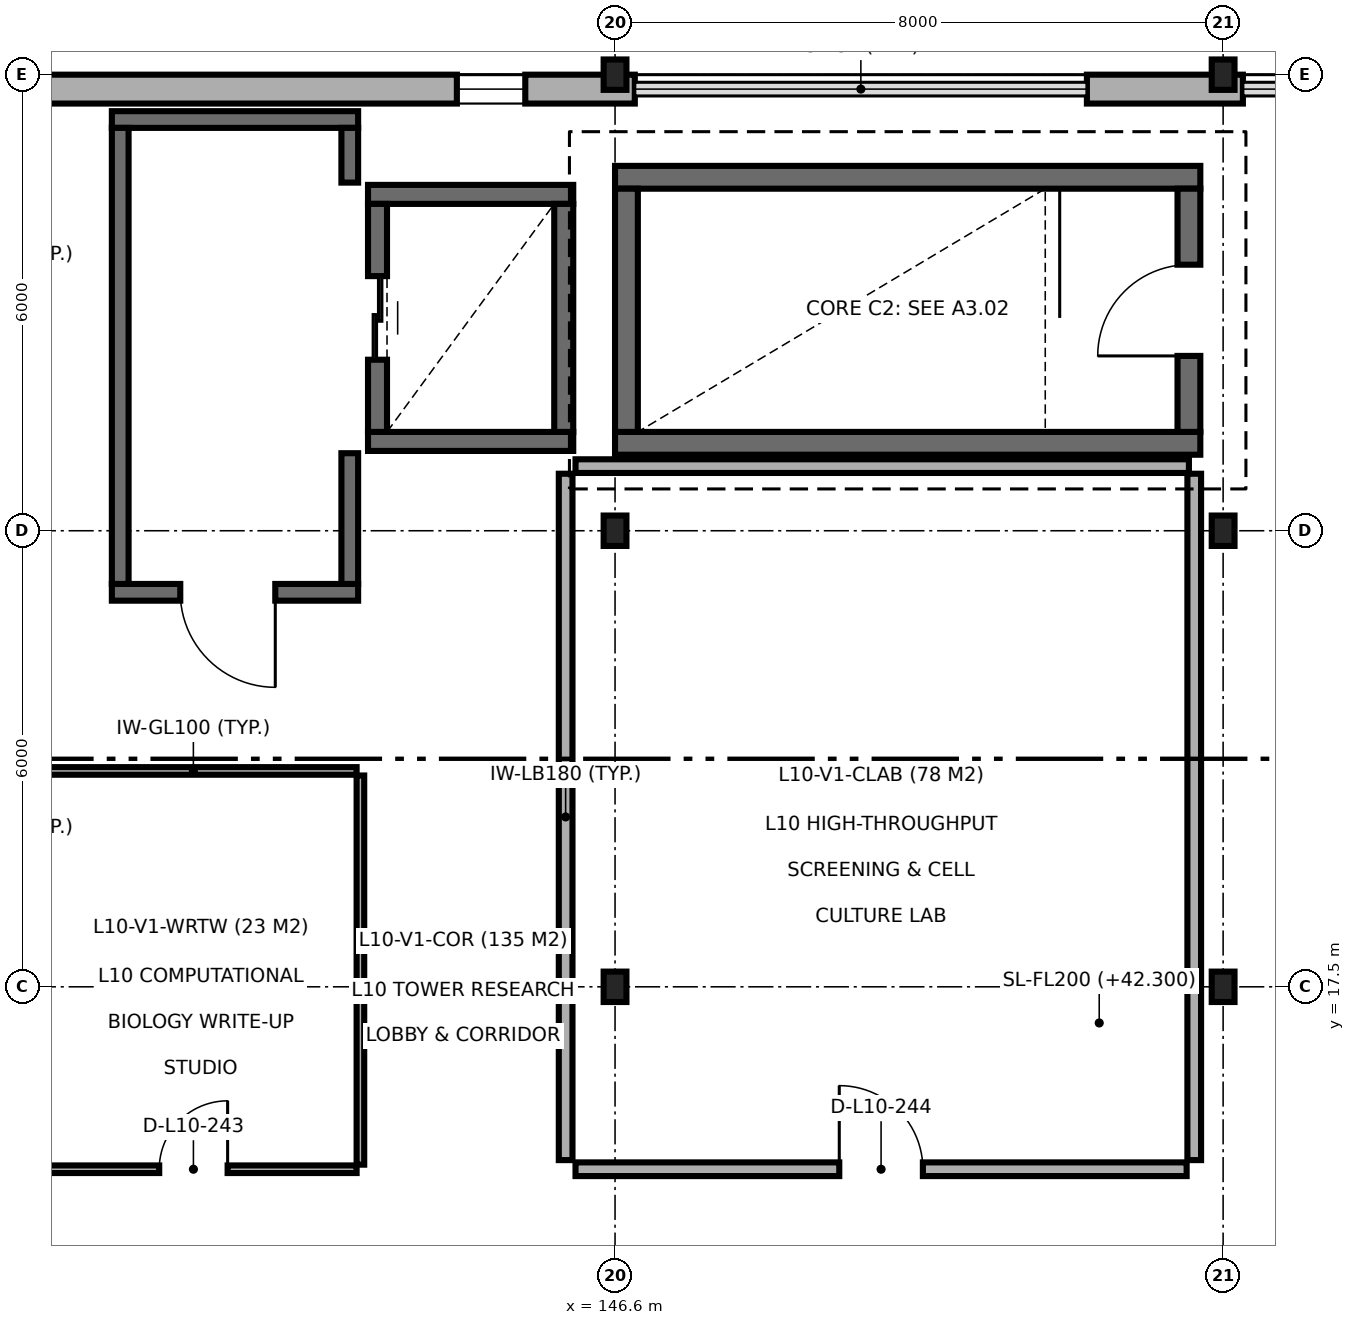
"""IFC4 building model, lengths in metres.
Left out: names, types, materials, properties, quantities, classifications, styles, units other than length and angle.
Written with IfcOpenShell. Run it as: python <this file> out.ifc"""

import sys

from ifc_helpers import new_model, si_unit, direction, frame, frame_2d, origin, origin_2d, place, context, subcontext, project, spatial, rectangle, i_section, extrude, element, fill, save


model = new_model("IFC4")
c1 = context("Model", 3, precision=1e-05, world=origin(), true_north=direction((0.0, 1.0)))
c2 = subcontext(c1, "Body", "Model", "MODEL_VIEW")
j1 = project(units=[si_unit("LENGTHUNIT", "METRE"), si_unit("PLANEANGLEUNIT", "RADIAN")], contexts=[c1])
p1 = place(None, origin())
s1 = spatial("IfcSite", under=j1, at=p1, CompositionType="ELEMENT")
p2 = place(p1, origin())
s2 = spatial("IfcBuilding", under=s1, at=p2, CompositionType="ELEMENT")
p3 = place(p2, frame((0.0, 0.0, 42.3)))
s3 = spatial("IfcBuildingStorey", under=s2, at=p3, CompositionType="ELEMENT", Elevation=42.3)
for number, where, z_axis, x_axis in (
    (1, (146.6, 17.5, 0.0), (0.0, 0.0, 1.0), (1.0, 0.0, 0.0)),
    (2, (146.6, 23.5, 0.0), (0.0, 0.0, 1.0), (1.0, 0.0, 0.0)),
    (3, (146.6, 29.5, 0.0), (0.0, 0.0, 1.0), (1.0, 0.0, 0.0)),
    (4, (154.6, 17.5, 0.0), (0.0, 0.0, 1.0), (1.0, 0.0, 0.0)),
    (5, (154.6, 23.5, 0.0), (0.0, 0.0, 1.0), (1.0, 0.0, 0.0)),
    (6, (154.6, 29.5, 0.0), (0.0, 0.0, 1.0), (1.0, 0.0, 0.0)),
):
    element("IfcColumn", number, at=place(p3, frame(where, z_axis=z_axis, x_axis=x_axis)), inside=s3, PredefinedType="COLUMN", context=c2, shape_type="SweptSolid", body=[
        extrude(i_section(OverallWidth=0.3, OverallDepth=0.4, WebThickness=0.013, FlangeThickness=0.024, FilletRadius=0.027, at=origin_2d()), origin(), (0.0, 0.0, 1.0), 3.9),
    ])
for number, where, z_axis, x_axis in (
    (7, (146.6, 24.65, 0.0), (0.0, 0.0, 1.0), (1.0, 0.0, 0.0)),
    (8, (154.3, 28.15, 0.0), (0.0, 0.0, 1.0), (-1.0, 0.0, 0.0)),
):
    element("IfcWall", number, at=place(p3, frame(where, z_axis=z_axis, x_axis=x_axis)), inside=s3, PredefinedType="SHEAR", context=c2, shape_type="SweptSolid", body=[
        extrude(rectangle(XDim=7.7, YDim=0.3, at=frame_2d((3.85, 0.0))), origin(), (0.0, 0.0, 1.0), 3.9),
    ])
p4 = place(p3, frame((146.75, 28.0, 0.0), z_axis=(0.0, 0.0, 1.0), x_axis=(0.0, -1.0, 0.0)))
e9 = element("IfcWall", 9, at=p4, inside=s3, PredefinedType="SHEAR", context=c2, shape_type="SweptSolid", body=[
    extrude(rectangle(XDim=3.2, YDim=0.3, at=frame_2d((1.6, 0.0))), origin(), (0.0, 0.0, 1.0), 3.9),
])
p5 = place(p3, frame((154.15, 24.8, 0.0), z_axis=(0.0, 0.0, 1.0), x_axis=(0.0, 1.0, 0.0)))
e10 = element("IfcWall", 10, at=p5, inside=s3, PredefinedType="SHEAR", context=c2, shape_type="SweptSolid", body=[
    extrude(rectangle(XDim=3.2, YDim=0.3, at=frame_2d((1.6, 0.0))), origin(), (0.0, 0.0, 1.0), 3.9),
])
p6 = place(p5, frame((1.0, 0.0, 0.0)))
e11 = element("IfcOpeningElement", 11, at=p6, cuts=e10, PredefinedType="OPENING", context=c2, shape_type="SweptSolid", body=[
    extrude(rectangle(XDim=1.2, YDim=2.15, at=frame_2d((0.6, 1.075))), frame((0.0, 0.16, 0.0), z_axis=(0.0, -1.0, 0.0), x_axis=(1.0, 0.0, 0.0)), (0.0, 0.0, 1.0), 0.32),
])
for number, where, z_axis, x_axis in (
    (12, (143.35, 24.675, 0.0), (0.0, 0.0, 1.0), (1.0, 0.0, 0.0)),
    (13, (146.05, 27.925, 0.0), (0.0, 0.0, 1.0), (-1.0, 0.0, 0.0)),
):
    element("IfcWall", number, at=place(p3, frame(where, z_axis=z_axis, x_axis=x_axis)), inside=s3, PredefinedType="SHEAR", context=c2, shape_type="SweptSolid", body=[
        extrude(rectangle(XDim=2.7, YDim=0.25, at=frame_2d((1.35, 0.0))), origin(), (0.0, 0.0, 1.0), 3.9),
    ])
p7 = place(p3, frame((143.475, 27.8, 0.0), z_axis=(0.0, 0.0, 1.0), x_axis=(0.0, -1.0, 0.0)))
e14 = element("IfcWall", 14, at=p7, inside=s3, PredefinedType="SHEAR", context=c2, shape_type="SweptSolid", body=[
    extrude(rectangle(XDim=3.0, YDim=0.25, at=frame_2d((1.5, 0.0))), origin(), (0.0, 0.0, 1.0), 3.9),
])
p8 = place(p7, frame((0.95, 0.0, 0.0)))
e15 = element("IfcOpeningElement", 15, at=p8, cuts=e14, PredefinedType="OPENING", context=c2, shape_type="SweptSolid", body=[
    extrude(rectangle(XDim=1.1, YDim=2.15, at=frame_2d((0.55, 1.075))), frame((0.0, 0.135, 0.0), z_axis=(0.0, -1.0, 0.0), x_axis=(1.0, 0.0, 0.0)), (0.0, 0.0, 1.0), 0.27),
])
p9 = place(p3, frame((145.925, 24.8, 0.0), z_axis=(0.0, 0.0, 1.0), x_axis=(0.0, 1.0, 0.0)))
e16 = element("IfcWall", 16, at=p9, inside=s3, PredefinedType="SHEAR", context=c2, shape_type="SweptSolid", body=[
    extrude(rectangle(XDim=3.0, YDim=0.25, at=frame_2d((1.5, 0.0))), origin(), (0.0, 0.0, 1.0), 3.9),
])
p10 = place(p3, frame((139.98, 22.69, 0.0), z_axis=(0.0, 0.0, 1.0), x_axis=(1.0, 0.0, 0.0)))
e17 = element("IfcWall", 17, at=p10, inside=s3, PredefinedType="SOLIDWALL", context=c2, shape_type="SweptSolid", body=[
    extrude(rectangle(XDim=3.24, YDim=0.22, at=frame_2d((1.62, 0.0))), origin(), (0.0, 0.0, 1.0), 3.66),
])
p11 = place(p10, frame((0.9, 0.0, 0.0)))
e18 = element("IfcOpeningElement", 18, at=p11, cuts=e17, PredefinedType="OPENING", context=c2, shape_type="SweptSolid", body=[
    extrude(rectangle(XDim=1.25, YDim=2.15, at=frame_2d((0.625, 1.075))), frame((0.0, 0.12, 0.0), z_axis=(0.0, -1.0, 0.0), x_axis=(1.0, 0.0, 0.0)), (0.0, 0.0, 1.0), 0.24),
])
p12 = place(p3, frame((143.22, 28.91, 0.0), z_axis=(0.0, 0.0, 1.0), x_axis=(-1.0, 0.0, 0.0)))
e19 = element("IfcWall", 19, at=p12, inside=s3, PredefinedType="SOLIDWALL", context=c2, shape_type="SweptSolid", body=[
    extrude(rectangle(XDim=3.24, YDim=0.22, at=frame_2d((1.62, 0.0))), origin(), (0.0, 0.0, 1.0), 3.66),
])
p13 = place(p3, frame((140.09, 28.8, 0.0), z_axis=(0.0, 0.0, 1.0), x_axis=(0.0, -1.0, 0.0)))
e20 = element("IfcWall", 20, at=p13, inside=s3, PredefinedType="SOLIDWALL", context=c2, shape_type="SweptSolid", body=[
    extrude(rectangle(XDim=6.0, YDim=0.22, at=frame_2d((3.0, 0.0))), origin(), (0.0, 0.0, 1.0), 3.66),
])
p14 = place(p3, frame((143.11, 22.8, 0.0), z_axis=(0.0, 0.0, 1.0), x_axis=(0.0, 1.0, 0.0)))
e21 = element("IfcWall", 21, at=p14, inside=s3, PredefinedType="SOLIDWALL", context=c2, shape_type="SweptSolid", body=[
    extrude(rectangle(XDim=1.72, YDim=0.22, at=frame_2d((0.86, 0.0))), origin(), (0.0, 0.0, 1.0), 3.66),
])
p15 = place(p3, frame((143.11, 28.08, 0.0), z_axis=(0.0, 0.0, 1.0), x_axis=(0.0, 1.0, 0.0)))
e22 = element("IfcWall", 22, at=p15, inside=s3, PredefinedType="SOLIDWALL", context=c2, shape_type="SweptSolid", body=[
    extrude(rectangle(XDim=0.72, YDim=0.22, at=frame_2d((0.36, 0.0))), origin(), (0.0, 0.0, 1.0), 3.66),
])
p16 = place(p3, frame((154.86, 29.31, 0.0), z_axis=(0.0, 0.0, 1.0), x_axis=(-1.0, 0.0, 0.0)))
e23 = element("IfcWall", 23, at=p16, inside=s3, PredefinedType="SOLIDWALL", context=c2, shape_type="SweptSolid", body=[
    extrude(rectangle(XDim=2.052, YDim=0.38, at=frame_2d((1.026, 0.0))), origin(), (0.0, 0.0, 1.0), 3.66),
])
p17 = place(p3, frame((146.86, 29.31, 0.0), z_axis=(0.0, 0.0, 1.0), x_axis=(-1.0, 0.0, 0.0)))
e24 = element("IfcWall", 24, at=p17, inside=s3, PredefinedType="SOLIDWALL", context=c2, shape_type="SweptSolid", body=[
    extrude(rectangle(XDim=8.26, YDim=0.38, at=frame_2d((4.13, 0.0))), origin(), (0.0, 0.0, 1.0), 3.66),
])
p18 = place(p17, frame((1.441, 0.0, 0.9)))
e25 = element("IfcOpeningElement", 25, at=p18, cuts=e24, PredefinedType="OPENING", context=c2, shape_type="SweptSolid", body=[
    extrude(rectangle(XDim=0.9, YDim=1.8, at=frame_2d((0.45, 0.9))), frame((0.0, 0.2, 0.0), z_axis=(0.0, -1.0, 0.0), x_axis=(1.0, 0.0, 0.0)), (0.0, 0.0, 1.0), 0.4),
])
p19 = place(p3, frame((138.905, 20.34, 0.0), z_axis=(0.0, 0.0, 1.0), x_axis=(1.0, 0.0, 0.0)))
e26 = element("IfcWall", 26, at=p19, inside=s3, PredefinedType="PARTITIONING", context=c2, shape_type="SweptSolid", body=[
    extrude(rectangle(XDim=4.295, YDim=0.1, at=frame_2d((2.147, 0.0))), origin(), (0.0, 0.0, 1.0), 3.68),
])
p20 = place(p3, frame((143.25, 15.16, 0.0), z_axis=(0.0, 0.0, 1.0), x_axis=(0.0, 1.0, 0.0)))
e27 = element("IfcWall", 27, at=p20, inside=s3, PredefinedType="PARTITIONING", context=c2, shape_type="SweptSolid", body=[
    extrude(rectangle(XDim=5.12, YDim=0.1, at=frame_2d((2.56, 0.0))), origin(), (0.0, 0.0, 1.0), 3.68),
])
p21 = place(p3, frame((138.905, 15.1, 0.0), z_axis=(0.0, 0.0, 1.0), x_axis=(1.0, 0.0, 0.0)))
e28 = element("IfcWall", 28, at=p21, inside=s3, PredefinedType="PARTITIONING", context=c2, shape_type="SweptSolid", body=[
    extrude(rectangle(XDim=4.295, YDim=0.1, at=frame_2d((2.147, 0.0))), origin(), (0.0, 0.0, 1.0), 3.68),
])
p22 = place(p21, frame((1.698, 0.0, 0.0)))
e29 = element("IfcOpeningElement", 29, at=p22, cuts=e28, PredefinedType="OPENING", context=c2, shape_type="SweptSolid", body=[
    extrude(rectangle(XDim=0.9, YDim=2.1, at=frame_2d((0.45, 1.05))), frame((0.0, 0.06, 0.0), z_axis=(0.0, -1.0, 0.0), x_axis=(1.0, 0.0, 0.0)), (0.0, 0.0, 1.0), 0.12),
])
p23 = place(p3, frame((145.95, 15.22, 0.0), z_axis=(0.0, 0.0, 1.0), x_axis=(0.0, 1.0, 0.0)))
e30 = element("IfcWall", 30, at=p23, inside=s3, PredefinedType="PARTITIONING", context=c2, shape_type="SweptSolid", body=[
    extrude(rectangle(XDim=9.03, YDim=0.18, at=frame_2d((4.515, 0.0))), origin(), (0.0, 0.0, 1.0), 3.68),
])
p24 = place(p3, frame((146.08, 24.35, 0.0), z_axis=(0.0, 0.0, 1.0), x_axis=(1.0, 0.0, 0.0)))
e31 = element("IfcWall", 31, at=p24, inside=s3, PredefinedType="PARTITIONING", context=c2, shape_type="SweptSolid", body=[
    extrude(rectangle(XDim=8.07, YDim=0.18, at=frame_2d((4.035, 0.0))), origin(), (0.0, 0.0, 1.0), 3.68),
])
p25 = place(p3, frame((154.22, 15.22, 0.0), z_axis=(0.0, 0.0, 1.0), x_axis=(0.0, 1.0, 0.0)))
e32 = element("IfcWall", 32, at=p25, inside=s3, PredefinedType="PARTITIONING", context=c2, shape_type="SweptSolid", body=[
    extrude(rectangle(XDim=9.03, YDim=0.18, at=frame_2d((4.515, 0.0))), origin(), (0.0, 0.0, 1.0), 3.68),
])
p26 = place(p3, frame((146.08, 15.1, 0.0), z_axis=(0.0, 0.0, 1.0), x_axis=(1.0, 0.0, 0.0)))
e33 = element("IfcWall", 33, at=p26, inside=s3, PredefinedType="PARTITIONING", context=c2, shape_type="SweptSolid", body=[
    extrude(rectangle(XDim=8.04, YDim=0.18, at=frame_2d((4.02, 0.0))), origin(), (0.0, 0.0, 1.0), 3.68),
])
p27 = place(p26, frame((3.47, 0.0, 0.0)))
e34 = element("IfcOpeningElement", 34, at=p27, cuts=e33, PredefinedType="OPENING", context=c2, shape_type="SweptSolid", body=[
    extrude(rectangle(XDim=1.1, YDim=2.15, at=frame_2d((0.55, 1.075))), frame((0.0, 0.1, 0.0), z_axis=(0.0, -1.0, 0.0), x_axis=(1.0, 0.0, 0.0)), (0.0, 0.0, 1.0), 0.2),
])
p28 = place(p6, origin())
e35 = element("IfcDoor", 35, at=p28, inside=s3, OperationType="SINGLE_SWING_LEFT", PredefinedType="DOOR", context=c2, shape_type="SweptSolid", body=[
    extrude(rectangle(XDim=1.2, YDim=2.15, at=frame_2d((0.6, 1.075))), frame((0.0, 0.025, 0.0), z_axis=(0.0, -1.0, 0.0), x_axis=(1.0, 0.0, 0.0)), (0.0, 0.0, 1.0), 0.05),
])
fill(e11, e35)
p29 = place(p8, origin())
e36 = element("IfcDoor", 36, at=p29, inside=s3, OperationType="DOUBLE_DOOR_SLIDING", PredefinedType="DOOR", context=c2, shape_type="SweptSolid", body=[
    extrude(rectangle(XDim=1.1, YDim=2.15, at=frame_2d((0.55, 1.075))), frame((0.0, 0.025, 0.0), z_axis=(0.0, -1.0, 0.0), x_axis=(1.0, 0.0, 0.0)), (0.0, 0.0, 1.0), 0.05),
])
fill(e15, e36)
p30 = place(p11, frame((1.25, 0.0, 0.0), z_axis=(0.0, 0.0, 1.0), x_axis=(-1.0, 0.0, 0.0)))
e37 = element("IfcDoor", 37, at=p30, inside=s3, OperationType="SINGLE_SWING_RIGHT", PredefinedType="DOOR", context=c2, shape_type="SweptSolid", body=[
    extrude(rectangle(XDim=1.25, YDim=2.15, at=frame_2d((0.625, 1.075))), frame((0.0, 0.025, 0.0), z_axis=(0.0, -1.0, 0.0), x_axis=(1.0, 0.0, 0.0)), (0.0, 0.0, 1.0), 0.05),
])
fill(e18, e37)
p31 = place(p18, origin())
e38 = element("IfcWindow", 38, at=p31, inside=s3, PartitioningType="SINGLE_PANEL", PredefinedType="WINDOW", context=c2, shape_type="SweptSolid", body=[
    extrude(rectangle(XDim=0.9, YDim=1.8, at=frame_2d((0.45, 0.9))), frame((0.0, 0.03, 0.0), z_axis=(0.0, -1.0, 0.0), x_axis=(1.0, 0.0, 0.0)), (0.0, 0.0, 1.0), 0.06),
])
fill(e25, e38)
p32 = place(p22, origin())
e39 = element("IfcDoor", 39, at=p32, inside=s3, OperationType="SINGLE_SWING_RIGHT", PredefinedType="DOOR", context=c2, shape_type="SweptSolid", body=[
    extrude(rectangle(XDim=0.9, YDim=2.1, at=frame_2d((0.45, 1.05))), frame((0.0, 0.025, 0.0), z_axis=(0.0, -1.0, 0.0), x_axis=(1.0, 0.0, 0.0)), (0.0, 0.0, 1.0), 0.05),
])
fill(e29, e39)
p33 = place(p27, origin())
e40 = element("IfcDoor", 40, at=p33, inside=s3, OperationType="SINGLE_SWING_LEFT", PredefinedType="DOOR", context=c2, shape_type="SweptSolid", body=[
    extrude(rectangle(XDim=1.1, YDim=2.15, at=frame_2d((0.55, 1.075))), frame((0.0, 0.025, 0.0), z_axis=(0.0, -1.0, 0.0), x_axis=(1.0, 0.0, 0.0)), (0.0, 0.0, 1.0), 0.05),
])
fill(e34, e40)
save(model, sys.argv[1])
